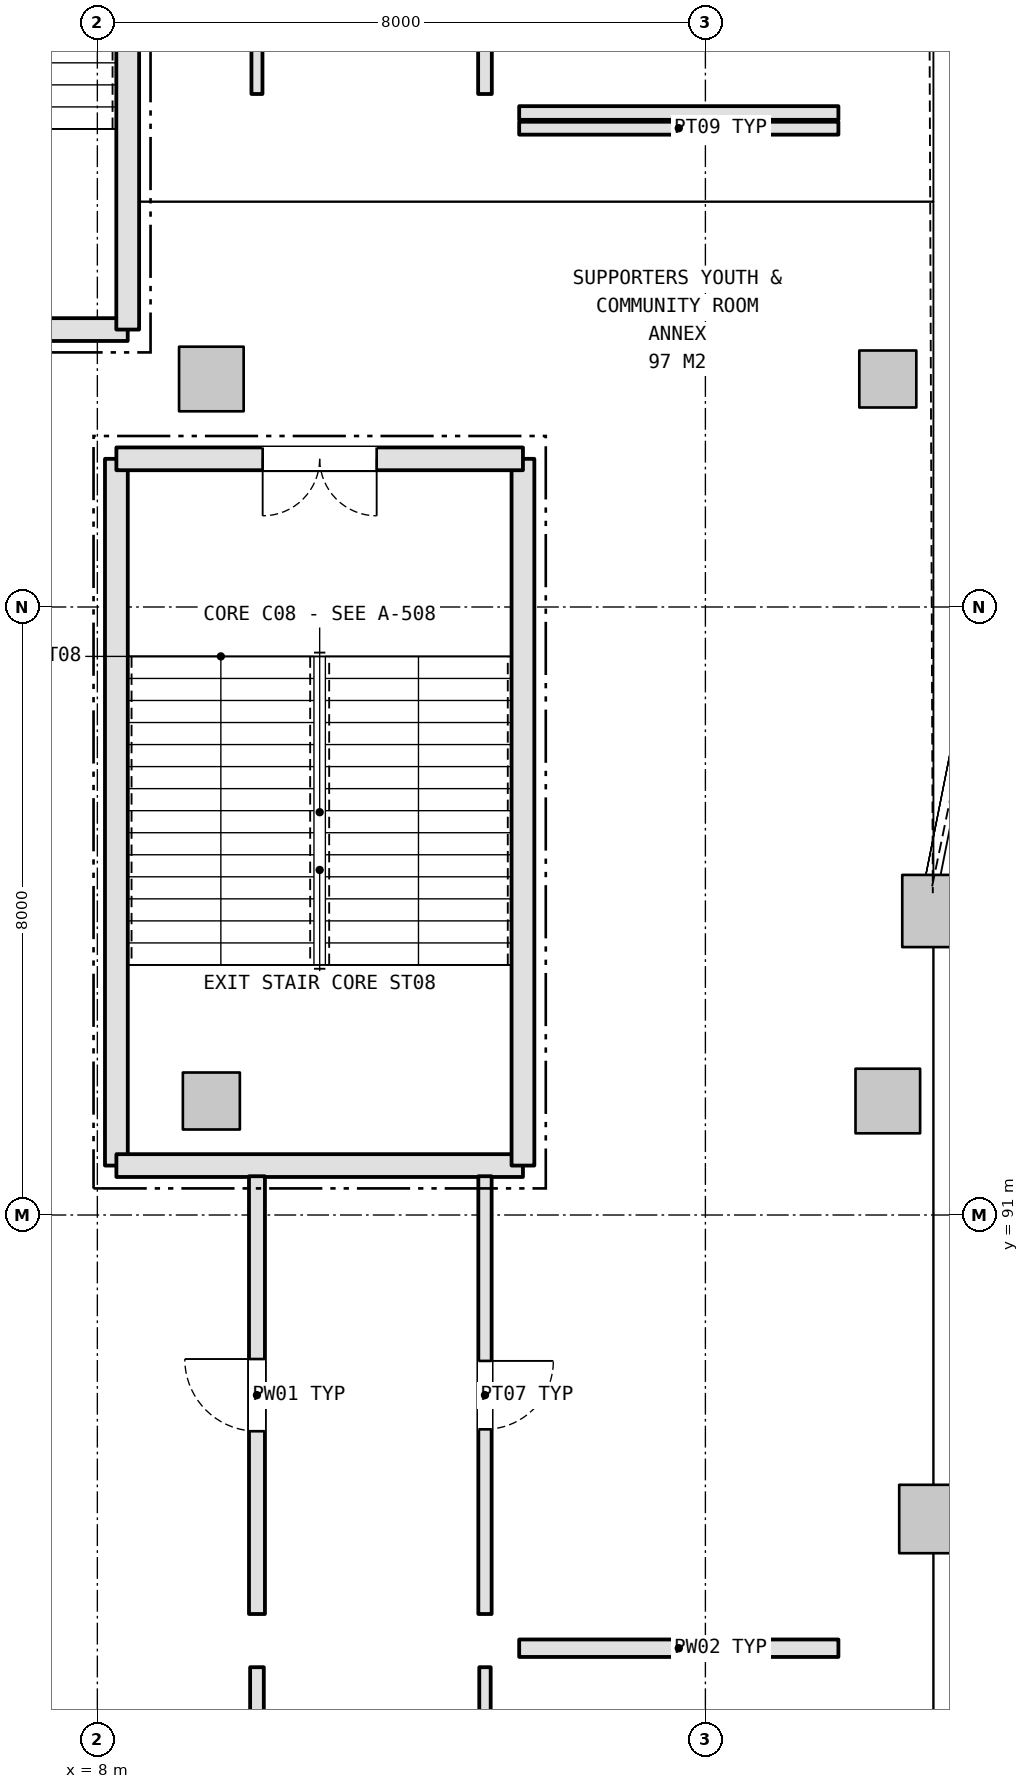
"""IFC4 building model, lengths in metres.
Left out: names, types, materials, properties, quantities, classifications, styles, units other than length and angle.
Written with IfcOpenShell. Run it as: python <this file> out.ifc"""

import sys

from ifc_helpers import new_model, si_unit, direction, frame, frame_2d, origin, origin_2d, place, context, subcontext, project, spatial, rectangle, extrude, element, fill, save


model = new_model("IFC4")
c1 = context("Model", 3, precision=1e-05, world=origin(), true_north=direction((0.0, 1.0)))
c2 = subcontext(c1, "Body", "Model", "MODEL_VIEW")
j1 = project(units=[si_unit("LENGTHUNIT", "METRE"), si_unit("PLANEANGLEUNIT", "RADIAN")], contexts=[c1])
p1 = place(None, origin())
s1 = spatial("IfcSite", under=j1, at=p1, CompositionType="ELEMENT")
p2 = place(p1, origin())
s2 = spatial("IfcBuilding", under=s1, at=p2, CompositionType="ELEMENT")
p3 = place(p2, frame((0.0, 0.0, 5.4)))
s3 = spatial("IfcBuildingStorey", under=s2, at=p3, CompositionType="ELEMENT", Elevation=5.4)
p4 = place(p3, frame((19.0, 95.0, 0.0), z_axis=(0.0, 0.0, 1.0), x_axis=(1.0, 0.0, 0.0)))
e1 = element("IfcColumn", 1, at=p4, inside=s3, PredefinedType="COLUMN", context=c2, shape_type="SweptSolid", body=[
    extrude(rectangle(XDim=0.82, YDim=0.95, at=origin_2d()), origin(), (0.0, 0.0, 1.0), 5.4),
])
p5 = place(p3, frame((19.0, 87.0, 0.0), z_axis=(0.0, 0.0, 1.0), x_axis=(1.0, 0.0, 0.0)))
e2 = element("IfcColumn", 2, at=p5, inside=s3, PredefinedType="COLUMN", context=c2, shape_type="SweptSolid", body=[
    extrude(rectangle(XDim=0.9, YDim=0.9, at=origin_2d()), origin(), (0.0, 0.0, 1.0), 5.4),
])
p6 = place(p3, frame((9.5, 92.5, 0.0), z_axis=(0.0, 0.0, 1.0), x_axis=(1.0, 0.0, 0.0)))
e3 = element("IfcColumn", 3, at=p6, inside=s3, PredefinedType="COLUMN", context=c2, shape_type="SweptSolid", body=[
    extrude(rectangle(XDim=0.75, YDim=0.75, at=origin_2d()), origin(), (0.0, 0.0, 1.0), 5.4),
])
for number, where, z_axis, x_axis in (
    (4, (9.5, 102.0, 0.0), (0.0, 0.0, 1.0), (1.0, 0.0, 0.0)),
    (5, (18.4, 92.5, 0.0), (0.0, 0.0, 1.0), (1.0, 0.0, 0.0)),
):
    element("IfcColumn", number, at=place(p3, frame(where, z_axis=z_axis, x_axis=x_axis)), inside=s3, PredefinedType="COLUMN", context=c2, shape_type="SweptSolid", body=[
        extrude(rectangle(XDim=0.85, YDim=0.85, at=origin_2d()), origin(), (0.0, 0.0, 1.0), 5.4),
    ])
p7 = place(p3, frame((18.4, 102.0, 0.0), z_axis=(0.0, 0.0, 1.0), x_axis=(1.0, 0.0, 0.0)))
e6 = element("IfcColumn", 6, at=p7, inside=s3, PredefinedType="COLUMN", context=c2, shape_type="SweptSolid", body=[
    extrude(rectangle(XDim=0.75, YDim=0.75, at=origin_2d()), origin(), (0.0, 0.0, 1.0), 5.4),
])
p8 = place(p3, frame((3.05, 102.65, 0.0), z_axis=(0.0, 0.0, 1.0), x_axis=(1.0, 0.0, 0.0)))
e7 = element("IfcWall", 7, at=p8, inside=s3, PredefinedType="SHEAR", context=c2, shape_type="SweptSolid", body=[
    extrude(rectangle(XDim=5.349, YDim=0.3, at=frame_2d((2.675, 0.0))), origin(), (0.0, 0.0, 1.0), 5.14),
])
for number, where, z_axis, x_axis in (
    (8, (8.4, 102.65, 0.0), (0.0, 0.0, 1.0), (0.0, 1.0, 0.0)),
    (9, (8.25, 100.95, 0.0), (0.0, 0.0, 1.0), (0.0, -1.0, 0.0)),
):
    element("IfcWall", number, at=place(p3, frame(where, z_axis=z_axis, x_axis=x_axis)), inside=s3, PredefinedType="SHEAR", context=c2, shape_type="SweptSolid", body=[
        extrude(rectangle(XDim=9.299, YDim=0.3, at=frame_2d((4.65, 0.0))), origin(), (0.0, 0.0, 1.0), 5.14),
    ])
p9 = place(p3, frame((8.25, 91.65, 0.0), z_axis=(0.0, 0.0, 1.0), x_axis=(1.0, 0.0, 0.0)))
e10 = element("IfcWall", 10, at=p9, inside=s3, PredefinedType="SHEAR", context=c2, shape_type="SweptSolid", body=[
    extrude(rectangle(XDim=5.349, YDim=0.3, at=frame_2d((2.675, 0.0))), origin(), (0.0, 0.0, 1.0), 5.14),
])
p10 = place(p3, frame((13.6, 91.65, 0.0), z_axis=(0.0, 0.0, 1.0), x_axis=(0.0, 1.0, 0.0)))
e11 = element("IfcWall", 11, at=p10, inside=s3, PredefinedType="SHEAR", context=c2, shape_type="SweptSolid", body=[
    extrude(rectangle(XDim=9.299, YDim=0.3, at=frame_2d((4.65, 0.0))), origin(), (0.0, 0.0, 1.0), 5.14),
])
p11 = place(p3, frame((13.6, 100.95, 0.0), z_axis=(0.0, 0.0, 1.0), x_axis=(-1.0, 0.0, 0.0)))
e12 = element("IfcWall", 12, at=p11, inside=s3, PredefinedType="SHEAR", context=c2, shape_type="SweptSolid", body=[
    extrude(rectangle(XDim=5.349, YDim=0.3, at=frame_2d((2.675, 0.0))), origin(), (0.0, 0.0, 1.0), 5.14),
])
p12 = place(p11, frame((1.925, 0.0, 0.0)))
e13 = element("IfcOpeningElement", 13, at=p12, cuts=e12, PredefinedType="OPENING", context=c2, shape_type="SweptSolid", body=[
    extrude(rectangle(XDim=1.5, YDim=2.2, at=frame_2d((0.75, 1.1))), frame((0.0, 0.16, 0.0), z_axis=(0.0, -1.0, 0.0), x_axis=(1.0, 0.0, 0.0)), (0.0, 0.0, 1.0), 0.32),
])
p13 = place(p3, frame((10.1, 85.05, 0.0), z_axis=(0.0, 0.0, 1.0), x_axis=(0.0, -1.0, 0.0)))
e14 = element("IfcWall", 14, at=p13, inside=s3, PredefinedType="PARTITIONING", context=c2, shape_type="SweptSolid", body=[
    extrude(rectangle(XDim=15.3, YDim=0.18, at=frame_2d((7.65, 0.0))), origin(), (0.0, 0.0, 1.0), 4.668),
])
p14 = place(p13, frame((7.17, 0.0, 0.0)))
e15 = element("IfcOpeningElement", 15, at=p14, cuts=e14, PredefinedType="OPENING", context=c2, shape_type="SweptSolid", body=[
    extrude(rectangle(XDim=0.96, YDim=2.15, at=frame_2d((0.48, 1.075))), frame((0.0, 0.1, 0.0), z_axis=(0.0, -1.0, 0.0), x_axis=(1.0, 0.0, 0.0)), (0.0, 0.0, 1.0), 0.2),
])
p15 = place(p3, frame((13.1, 69.75, 0.0), z_axis=(0.0, 0.0, 1.0), x_axis=(0.0, 1.0, 0.0)))
e16 = element("IfcWall", 16, at=p15, inside=s3, PredefinedType="PARTITIONING", context=c2, shape_type="SweptSolid", body=[
    extrude(rectangle(XDim=15.3, YDim=0.15, at=frame_2d((7.65, 0.0))), origin(), (0.0, 0.0, 1.0), 4.668),
])
p16 = place(p15, frame((7.075, 0.0, 0.0)))
e17 = element("IfcOpeningElement", 17, at=p16, cuts=e16, PredefinedType="OPENING", context=c2, shape_type="SweptSolid", body=[
    extrude(rectangle(XDim=1.15, YDim=2.2, at=frame_2d((0.575, 1.1))), frame((0.0, 0.085, 0.0), z_axis=(0.0, -1.0, 0.0), x_axis=(1.0, 0.0, 0.0)), (0.0, 0.0, 1.0), 0.17),
])
p17 = place(p3, frame((13.55, 85.3, 0.0), z_axis=(0.0, 0.0, 1.0), x_axis=(1.0, 0.0, 0.0)))
e18 = element("IfcWall", 18, at=p17, inside=s3, PredefinedType="PLUMBINGWALL", context=c2, shape_type="SweptSolid", body=[
    extrude(rectangle(XDim=4.2, YDim=0.23, at=frame_2d((2.1, 0.0))), origin(), (0.0, 0.0, 1.0), 5.12),
])
p18 = place(p3, frame((10.1, 91.51, 0.0), z_axis=(0.0, 0.0, 1.0), x_axis=(0.0, -1.0, 0.0)))
e19 = element("IfcWall", 19, at=p18, inside=s3, PredefinedType="PLUMBINGWALL", context=c2, shape_type="SweptSolid", body=[
    extrude(rectangle(XDim=5.76, YDim=0.21, at=frame_2d((2.88, 0.0))), origin(), (0.0, 0.0, 1.0), 5.12),
])
p19 = place(p18, frame((2.405, 0.0, 0.0)))
e20 = element("IfcOpeningElement", 20, at=p19, cuts=e19, PredefinedType="OPENING", context=c2, shape_type="SweptSolid", body=[
    extrude(rectangle(XDim=0.95, YDim=2.15, at=frame_2d((0.475, 1.075))), frame((0.0, 0.115, 0.0), z_axis=(0.0, -1.0, 0.0), x_axis=(1.0, 0.0, 0.0)), (0.0, 0.0, 1.0), 0.23),
])
p20 = place(p3, frame((13.1, 85.75, 0.0), z_axis=(0.0, 0.0, 1.0), x_axis=(0.0, 1.0, 0.0)))
e21 = element("IfcWall", 21, at=p20, inside=s3, PredefinedType="PARTITIONING", context=c2, shape_type="SweptSolid", body=[
    extrude(rectangle(XDim=5.76, YDim=0.175, at=frame_2d((2.88, 0.0))), origin(), (0.0, 0.0, 1.0), 5.12),
])
p21 = place(p20, frame((2.43, 0.0, 0.0)))
e22 = element("IfcOpeningElement", 22, at=p21, cuts=e21, PredefinedType="OPENING", context=c2, shape_type="SweptSolid", body=[
    extrude(rectangle(XDim=0.9, YDim=2.1, at=frame_2d((0.45, 1.05))), frame((0.0, 0.097, 0.0), z_axis=(0.0, -1.0, 0.0), x_axis=(1.0, 0.0, 0.0)), (0.0, 0.0, 1.0), 0.195),
])
p22 = place(p3, frame((13.55, 105.3, 0.0), z_axis=(0.0, 0.0, 1.0), x_axis=(1.0, 0.0, 0.0)))
e23 = element("IfcWall", 23, at=p22, inside=s3, PredefinedType="PARTITIONING", context=c2, shape_type="SweptSolid", body=[
    extrude(rectangle(XDim=4.2, YDim=0.17, at=frame_2d((2.1, 0.0))), origin(), (0.0, 0.0, 1.0), 5.12),
])
p23 = place(p3, frame((10.1, 121.05, 0.0), z_axis=(0.0, 0.0, 1.0), x_axis=(0.0, -1.0, 0.0)))
e24 = element("IfcWall", 24, at=p23, inside=s3, PredefinedType="PARTITIONING", context=c2, shape_type="SweptSolid", body=[
    extrude(rectangle(XDim=15.3, YDim=0.145, at=frame_2d((7.65, 0.0))), origin(), (0.0, 0.0, 1.0), 4.668),
])
p24 = place(p23, frame((7.11, 0.0, 0.0)))
e25 = element("IfcOpeningElement", 25, at=p24, cuts=e24, PredefinedType="OPENING", context=c2, shape_type="SweptSolid", body=[
    extrude(rectangle(XDim=1.08, YDim=2.25, at=frame_2d((0.54, 1.125))), frame((0.0, 0.083, 0.0), z_axis=(0.0, -1.0, 0.0), x_axis=(1.0, 0.0, 0.0)), (0.0, 0.0, 1.0), 0.165),
])
p25 = place(p3, frame((13.1, 105.75, 0.0), z_axis=(0.0, 0.0, 1.0), x_axis=(0.0, 1.0, 0.0)))
e26 = element("IfcWall", 26, at=p25, inside=s3, PredefinedType="PARTITIONING", context=c2, shape_type="SweptSolid", body=[
    extrude(rectangle(XDim=6.76, YDim=0.18, at=frame_2d((3.38, 0.0))), origin(), (0.0, 0.0, 1.0), 4.668),
])
p26 = place(p25, frame((2.755, 0.0, 0.0)))
e27 = element("IfcOpeningElement", 27, at=p26, cuts=e26, PredefinedType="OPENING", context=c2, shape_type="SweptSolid", body=[
    extrude(rectangle(XDim=1.25, YDim=2.2, at=frame_2d((0.625, 1.1))), frame((0.0, 0.1, 0.0), z_axis=(0.0, -1.0, 0.0), x_axis=(1.0, 0.0, 0.0)), (0.0, 0.0, 1.0), 0.2),
])
p27 = place(p3, frame((17.75, 105.5, 0.0), z_axis=(0.0, 0.0, 1.0), x_axis=(-1.0, 0.0, 0.0)))
e28 = element("IfcWall", 28, at=p27, inside=s3, PredefinedType="PARTITIONING", context=c2, shape_type="SweptSolid", body=[
    extrude(rectangle(XDim=4.2, YDim=0.18, at=frame_2d((2.1, 0.0))), origin(), (0.0, 0.0, 1.0), 5.12),
])
p28 = place(p12, origin())
e29 = element("IfcDoor", 29, at=p28, inside=s3, OperationType="DOUBLE_DOOR_SINGLE_SWING", PredefinedType="DOOR", context=c2, shape_type="SweptSolid", body=[
    extrude(rectangle(XDim=1.5, YDim=2.2, at=frame_2d((0.75, 1.1))), frame((0.0, 0.025, 0.0), z_axis=(0.0, -1.0, 0.0), x_axis=(1.0, 0.0, 0.0)), (0.0, 0.0, 1.0), 0.05),
])
fill(e13, e29)
p29 = place(p19, frame((0.95, 0.0, 0.0), z_axis=(0.0, 0.0, 1.0), x_axis=(-1.0, 0.0, 0.0)))
e30 = element("IfcDoor", 30, at=p29, inside=s3, OperationType="SINGLE_SWING_LEFT", PredefinedType="DOOR", context=c2, shape_type="SweptSolid", body=[
    extrude(rectangle(XDim=0.95, YDim=2.15, at=frame_2d((0.475, 1.075))), frame((0.0, 0.025, 0.0), z_axis=(0.0, -1.0, 0.0), x_axis=(1.0, 0.0, 0.0)), (0.0, 0.0, 1.0), 0.05),
])
fill(e20, e30)
p30 = place(p21, frame((0.9, 0.0, 0.0), z_axis=(0.0, 0.0, 1.0), x_axis=(-1.0, 0.0, 0.0)))
e31 = element("IfcDoor", 31, at=p30, inside=s3, OperationType="SINGLE_SWING_RIGHT", PredefinedType="DOOR", context=c2, shape_type="SweptSolid", body=[
    extrude(rectangle(XDim=0.9, YDim=2.1, at=frame_2d((0.45, 1.05))), frame((0.0, 0.025, 0.0), z_axis=(0.0, -1.0, 0.0), x_axis=(1.0, 0.0, 0.0)), (0.0, 0.0, 1.0), 0.05),
])
fill(e22, e31)
save(model, sys.argv[1])
